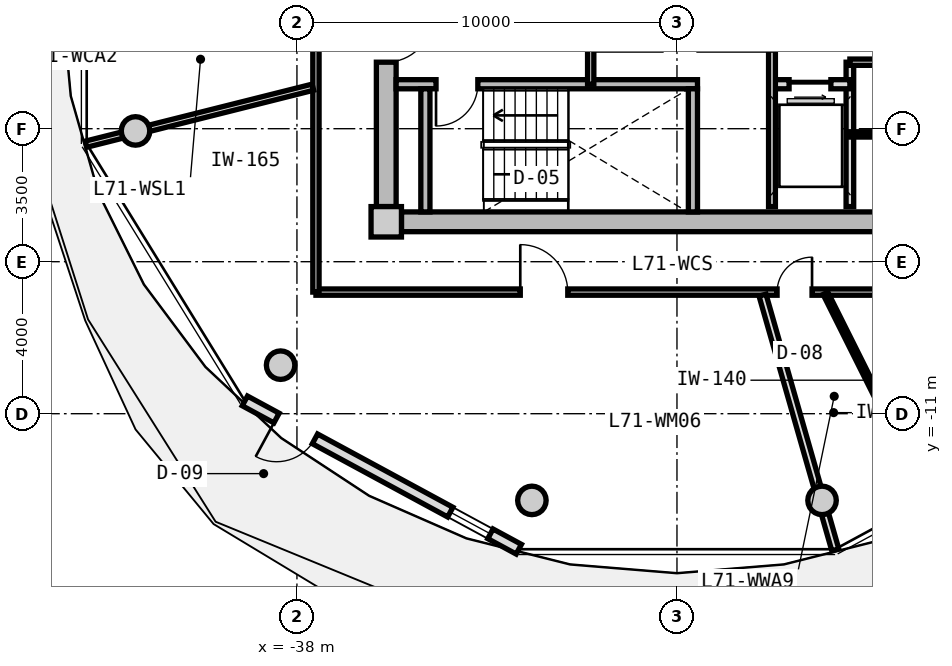
"""IFC4 building model, lengths in metres.
Left out: names, types, materials, properties, quantities, classifications, styles, units other than length and angle.
Written with IfcOpenShell. Run it as: python <this file> out.ifc"""

import sys

from ifc_helpers import new_model, si_unit, direction, frame, frame_2d, origin, origin_2d, place, context, subcontext, project, spatial, rectangle, circle, extrude, source, transform, mapped, element, fill, save


model = new_model("IFC4")
c1 = context("Model", 3, precision=1e-05, world=origin(), true_north=direction((0.0, 1.0)))
c2 = subcontext(c1, "Body", "Model", "MODEL_VIEW")
j1 = project(units=[si_unit("LENGTHUNIT", "METRE"), si_unit("PLANEANGLEUNIT", "RADIAN")], contexts=[c1])
p1 = place(None, origin())
s1 = spatial("IfcSite", under=j1, at=p1, CompositionType="ELEMENT")
p2 = place(p1, origin())
s2 = spatial("IfcBuilding", under=s1, at=p2, CompositionType="ELEMENT")
p3 = place(p2, frame((0.0, 0.0, 229.15)))
s3 = spatial("IfcBuildingStorey", under=s2, at=p3, CompositionType="ELEMENT", Elevation=229.15)
m1 = source(origin(), c2, "Body", "SweptSolid", [
    extrude(rectangle(XDim=0.8, YDim=0.8, at=origin_2d()), origin(), (0.0, 0.0, 1.0), 3.05),
])
p4 = place(p3, frame((-35.65, -5.95, 0.0), z_axis=(0.0, 0.0, 1.0), x_axis=(1.0, 0.0, 0.0)))
e1 = element("IfcColumn", 1, at=p4, inside=s3, PredefinedType="COLUMN", context=c2, shape_type="MappedRepresentation", body=[
    mapped(m1, transform((0.0, 0.0, 0.0), x_axis=(1.0, 0.0, 0.0), y_axis=(0.0, 1.0, 0.0), z_axis=(0.0, 0.0, 1.0), scale=1.0)),
])
m2 = source(origin(), c2, "Body", "SweptSolid", [
    extrude(rectangle(XDim=14.5, YDim=0.52, at=frame_2d((7.25, 0.0))), origin(), (0.0, 0.0, 1.0), 2.81),
])
p5 = place(p3, frame((-20.75, -5.95, 0.0), z_axis=(0.0, 0.0, 1.0), x_axis=(-1.0, 0.0, 0.0)))
e2 = element("IfcWall", 2, at=p5, inside=s3, PredefinedType="SHEAR", context=c2, shape_type="MappedRepresentation", body=[
    mapped(m2, transform((0.0, 0.0, 0.0), x_axis=(1.0, 0.0, 0.0), y_axis=(0.0, 1.0, 0.0), z_axis=(0.0, 0.0, 1.0), scale=1.0)),
])
m3 = source(origin(), c2, "Body", "SweptSolid", [
    extrude(rectangle(XDim=11.1, YDim=0.52, at=frame_2d((5.55, 0.0))), origin(), (0.0, 0.0, 1.0), 2.81),
])
p6 = place(p3, frame((-35.65, -5.55, 0.0), z_axis=(0.0, 0.0, 1.0), x_axis=(0.0, 1.0, 0.0)))
e3 = element("IfcWall", 3, at=p6, inside=s3, PredefinedType="SHEAR", context=c2, shape_type="MappedRepresentation", body=[
    mapped(m3, transform((0.0, 0.0, 0.0), x_axis=(1.0, 0.0, 0.0), y_axis=(0.0, 1.0, 0.0), z_axis=(0.0, 0.0, 1.0), scale=1.0)),
])
p7 = place(p6, frame((3.8, 0.0, 0.0)))
e4 = element("IfcOpeningElement", 4, at=p7, cuts=e3, PredefinedType="OPENING", context=c2, shape_type="SweptSolid", body=[
    extrude(rectangle(XDim=1.2, YDim=2.15, at=frame_2d((0.6, 1.075))), frame((0.0, 0.27, 0.0), z_axis=(0.0, -1.0, 0.0), x_axis=(1.0, 0.0, 0.0)), (0.0, 0.0, 1.0), 0.54),
])
m4 = source(origin(), c2, "Body", "SweptSolid", [
    extrude(circle(Radius=0.375, at=origin_2d()), origin(), (0.0, 0.0, 1.0), 3.05),
])
for number, where, z_axis, x_axis in (
    (5, (-42.247, -3.559, 0.0), (0.0, 0.0, 1.0), (1.0, 0.0, 0.0)),
    (6, (-38.43, -9.723, 0.0), (0.0, 0.0, 1.0), (1.0, 0.0, 0.0)),
    (7, (-31.818, -13.281, 0.0), (0.0, 0.0, 1.0), (1.0, 0.0, 0.0)),
    (8, (-24.182, -13.281, 0.0), (0.0, 0.0, 1.0), (1.0, 0.0, 0.0)),
):
    element("IfcColumn", number, at=place(p3, frame(where, z_axis=z_axis, x_axis=x_axis)), inside=s3, PredefinedType="COLUMN", context=c2, shape_type="MappedRepresentation", body=[
        mapped(m4, transform((0.0, 0.0, 0.0), x_axis=(1.0, 0.0, 0.0), y_axis=(0.0, 1.0, 0.0), z_axis=(0.0, 0.0, 1.0), scale=1.0)),
    ])
m5 = source(origin(), c2, "Body", "SweptSolid", [
    extrude(rectangle(XDim=8.197, YDim=0.29, at=frame_2d((4.099, 0.0))), origin(), (0.0, 0.0, 1.0), 2.81),
])
p8 = place(p3, frame((-32.162, -14.566, 0.0), z_axis=(0.0, 0.0, 1.0), x_axis=(-0.879369910001, 0.476139224791, 0.0)))
e9 = element("IfcWall", 9, at=p8, inside=s3, PredefinedType="SOLIDWALL", context=c2, shape_type="MappedRepresentation", body=[
    mapped(m5, transform((0.0, 0.0, 0.0), x_axis=(1.0, 0.0, 0.0), y_axis=(0.0, 1.0, 0.0), z_axis=(0.0, 0.0, 1.0), scale=1.0)),
])
p9 = place(p8, frame((6.1, 0.0, 0.0)))
e10 = element("IfcOpeningElement", 10, at=p9, cuts=e9, PredefinedType="OPENING", context=c2, shape_type="SweptSolid", body=[
    extrude(rectangle(XDim=1.15, YDim=2.25, at=frame_2d((0.575, 1.125))), frame((0.0, 0.155, 0.0), z_axis=(0.0, -1.0, 0.0), x_axis=(1.0, 0.0, 0.0)), (0.0, 0.0, 1.0), 0.31),
])
p10 = place(p8, frame((0.85, 0.0, 0.85)))
e11 = element("IfcOpeningElement", 11, at=p10, cuts=e9, PredefinedType="OPENING", context=c2, shape_type="SweptSolid", body=[
    extrude(rectangle(XDim=1.2, YDim=1.5, at=frame_2d((0.6, 0.75))), frame((0.0, 0.155, 0.0), z_axis=(0.0, -1.0, 0.0), x_axis=(1.0, 0.0, 0.0)), (0.0, 0.0, 1.0), 0.31),
])
m6 = source(origin(), c2, "Body", "SweptSolid", [
    extrude(rectangle(XDim=7.93, YDim=0.24, at=frame_2d((3.965, 0.0))), origin(), (0.0, 0.0, 1.0), 2.81),
])
p11 = place(p3, frame((-35.39, -2.33, 0.0), z_axis=(0.0, 0.0, 1.0), x_axis=(1.0, 0.0, 0.0)))
e12 = element("IfcWall", 12, at=p11, inside=s3, PredefinedType="PARTITIONING", context=c2, shape_type="MappedRepresentation", body=[
    mapped(m6, transform((0.0, 0.0, 0.0), x_axis=(1.0, 0.0, 0.0), y_axis=(0.0, 1.0, 0.0), z_axis=(0.0, 0.0, 1.0), scale=1.0)),
])
p12 = place(p11, frame((1.05, 0.0, 0.0)))
e13 = element("IfcOpeningElement", 13, at=p12, cuts=e12, PredefinedType="OPENING", context=c2, shape_type="SweptSolid", body=[
    extrude(rectangle(XDim=1.1, YDim=2.15, at=frame_2d((0.55, 1.075))), frame((0.0, 0.13, 0.0), z_axis=(0.0, -1.0, 0.0), x_axis=(1.0, 0.0, 0.0)), (0.0, 0.0, 1.0), 0.26),
])
m7 = source(origin(), c2, "Body", "SweptSolid", [
    extrude(rectangle(XDim=3.24, YDim=0.24, at=frame_2d((1.62, 0.0))), origin(), (0.0, 0.0, 1.0), 2.81),
])
for number, where, z_axis, x_axis in (
    (14, (-34.62, -5.69, 0.0), (0.0, 0.0, 1.0), (0.0, 1.0, 0.0)),
    (15, (-27.58, -5.69, 0.0), (0.0, 0.0, 1.0), (0.0, 1.0, 0.0)),
):
    element("IfcWall", number, at=place(p3, frame(where, z_axis=z_axis, x_axis=x_axis)), inside=s3, PredefinedType="PARTITIONING", context=c2, shape_type="MappedRepresentation", body=[
        mapped(m7, transform((0.0, 0.0, 0.0), x_axis=(1.0, 0.0, 0.0), y_axis=(0.0, 1.0, 0.0), z_axis=(0.0, 0.0, 1.0), scale=1.0)),
    ])
m8 = source(origin(), c2, "Body", "SweptSolid", [
    extrude(rectangle(XDim=3.8, YDim=0.2, at=frame_2d((1.9, 0.0))), origin(), (0.0, 0.0, 1.0), 2.795),
])
p13 = place(p3, frame((-23.45, -5.55, 0.0), z_axis=(0.0, 0.0, 1.0), x_axis=(0.0, 1.0, 0.0)))
e16 = element("IfcWall", 16, at=p13, inside=s3, PredefinedType="PARTITIONING", context=c2, shape_type="MappedRepresentation", body=[
    mapped(m8, transform((0.0, 0.0, 0.0), x_axis=(1.0, 0.0, 0.0), y_axis=(0.0, 1.0, 0.0), z_axis=(0.0, 0.0, 1.0), scale=1.0)),
])
m9 = source(origin(), c2, "Body", "SweptSolid", [
    extrude(rectangle(XDim=2.05, YDim=0.24, at=frame_2d((1.025, 0.0))), origin(), (0.0, 0.0, 1.0), 2.795),
])
p14 = place(p3, frame((-25.5, -2.33, 0.0), z_axis=(0.0, 0.0, 1.0), x_axis=(1.0, 0.0, 0.0)))
e17 = element("IfcWall", 17, at=p14, inside=s3, PredefinedType="PARTITIONING", context=c2, shape_type="MappedRepresentation", body=[
    mapped(m9, transform((0.0, 0.0, 0.0), x_axis=(1.0, 0.0, 0.0), y_axis=(0.0, 1.0, 0.0), z_axis=(0.0, 0.0, 1.0), scale=1.0)),
])
p15 = place(p14, frame((0.45, 0.0, 0.0)))
e18 = element("IfcOpeningElement", 18, at=p15, cuts=e17, PredefinedType="OPENING", context=c2, shape_type="SweptSolid", body=[
    extrude(rectangle(XDim=1.1, YDim=2.2, at=frame_2d((0.55, 1.1))), frame((0.0, 0.13, 0.0), z_axis=(0.0, -1.0, 0.0), x_axis=(1.0, 0.0, 0.0)), (0.0, 0.0, 1.0), 0.26),
])
m10 = source(origin(), c2, "Body", "SweptSolid", [
    extrude(rectangle(XDim=4.2, YDim=0.18, at=frame_2d((2.1, 0.0))), origin(), (0.0, 0.0, 1.0), 2.795),
])
p16 = place(p3, frame((-25.5, -5.55, 0.0), z_axis=(0.0, 0.0, 1.0), x_axis=(0.0, 1.0, 0.0)))
e19 = element("IfcWall", 19, at=p16, inside=s3, PredefinedType="PARTITIONING", context=c2, shape_type="MappedRepresentation", body=[
    mapped(m10, transform((0.0, 0.0, 0.0), x_axis=(1.0, 0.0, 0.0), y_axis=(0.0, 1.0, 0.0), z_axis=(0.0, 0.0, 1.0), scale=1.0)),
])
m11 = source(origin(), c2, "Body", "SweptSolid", [
    extrude(rectangle(XDim=0.98, YDim=0.165, at=frame_2d((0.49, 0.0))), origin(), (0.0, 0.0, 1.0), 2.795),
])
p17 = place(p3, frame((-30.27, -2.33, 0.0), z_axis=(0.0, 0.0, 1.0), x_axis=(0.0, 1.0, 0.0)))
e20 = element("IfcWall", 20, at=p17, inside=s3, PredefinedType="PARTITIONING", context=c2, shape_type="MappedRepresentation", body=[
    mapped(m11, transform((0.0, 0.0, 0.0), x_axis=(1.0, 0.0, 0.0), y_axis=(0.0, 1.0, 0.0), z_axis=(0.0, 0.0, 1.0), scale=1.0)),
])
m12 = source(origin(), c2, "Body", "SweptSolid", [
    extrude(rectangle(XDim=2.7, YDim=0.165, at=frame_2d((1.35, 0.0))), origin(), (0.0, 0.0, 1.0), 2.795),
])
p18 = place(p3, frame((-23.45, -1.75, 0.0), z_axis=(0.0, 0.0, 1.0), x_axis=(1.0, 0.0, 0.0)))
e21 = element("IfcWall", 21, at=p18, inside=s3, PredefinedType="PARTITIONING", context=c2, shape_type="MappedRepresentation", body=[
    mapped(m12, transform((0.0, 0.0, 0.0), x_axis=(1.0, 0.0, 0.0), y_axis=(0.0, 1.0, 0.0), z_axis=(0.0, 0.0, 1.0), scale=1.0)),
])
p19 = place(p18, frame((0.85, 0.0, 0.0)))
e22 = element("IfcOpeningElement", 22, at=p19, cuts=e21, PredefinedType="OPENING", context=c2, shape_type="SweptSolid", body=[
    extrude(rectangle(XDim=0.925, YDim=2.1, at=frame_2d((0.462, 1.05))), frame((0.0, 0.093, 0.0), z_axis=(0.0, -1.0, 0.0), x_axis=(1.0, 0.0, 0.0)), (0.0, 0.0, 1.0), 0.185),
])
m13 = source(origin(), c2, "Body", "SweptSolid", [
    extrude(rectangle(XDim=2.7, YDim=0.14, at=frame_2d((1.35, 0.0))), origin(), (0.0, 0.0, 1.0), 2.795),
])
p20 = place(p3, frame((-23.45, -3.65, 0.0), z_axis=(0.0, 0.0, 1.0), x_axis=(1.0, 0.0, 0.0)))
e23 = element("IfcWall", 23, at=p20, inside=s3, PredefinedType="PARTITIONING", context=c2, shape_type="MappedRepresentation", body=[
    mapped(m13, transform((0.0, 0.0, 0.0), x_axis=(1.0, 0.0, 0.0), y_axis=(0.0, 1.0, 0.0), z_axis=(0.0, 0.0, 1.0), scale=1.0)),
])
m14 = source(origin(), c2, "Body", "SweptSolid", [
    extrude(rectangle(XDim=19.0, YDim=0.165, at=frame_2d((9.5, 0.0))), origin(), (0.0, 0.0, 1.0), 2.795),
])
p21 = place(p3, frame((-18.5, -7.8, 0.0), z_axis=(0.0, 0.0, 1.0), x_axis=(-1.0, 0.0, 0.0)))
e24 = element("IfcWall", 24, at=p21, inside=s3, PredefinedType="PARTITIONING", context=c2, shape_type="MappedRepresentation", body=[
    mapped(m14, transform((0.0, 0.0, 0.0), x_axis=(1.0, 0.0, 0.0), y_axis=(0.0, 1.0, 0.0), z_axis=(0.0, 0.0, 1.0), scale=1.0)),
])
p22 = place(p21, frame((12.373, 0.0, 0.0)))
e25 = element("IfcOpeningElement", 25, at=p22, cuts=e24, PredefinedType="OPENING", context=c2, shape_type="SweptSolid", body=[
    extrude(rectangle(XDim=1.25, YDim=2.2, at=frame_2d((0.625, 1.1))), frame((0.0, 0.093, 0.0), z_axis=(0.0, -1.0, 0.0), x_axis=(1.0, 0.0, 0.0)), (0.0, 0.0, 1.0), 0.185),
])
p23 = place(p21, frame((5.946, 0.0, 0.0)))
e26 = element("IfcOpeningElement", 26, at=p23, cuts=e24, PredefinedType="OPENING", context=c2, shape_type="SweptSolid", body=[
    extrude(rectangle(XDim=0.92, YDim=2.1, at=frame_2d((0.46, 1.05))), frame((0.0, 0.093, 0.0), z_axis=(0.0, -1.0, 0.0), x_axis=(1.0, 0.0, 0.0)), (0.0, 0.0, 1.0), 0.185),
])
p24 = place(p21, frame((2.83, 0.0, 0.0)))
e27 = element("IfcOpeningElement", 27, at=p24, cuts=e24, PredefinedType="OPENING", context=c2, shape_type="SweptSolid", body=[
    extrude(rectangle(XDim=0.92, YDim=2.1, at=frame_2d((0.46, 1.05))), frame((0.0, 0.093, 0.0), z_axis=(0.0, -1.0, 0.0), x_axis=(1.0, 0.0, 0.0)), (0.0, 0.0, 1.0), 0.185),
])
m15 = source(origin(), c2, "Body", "SweptSolid", [
    extrude(rectangle(XDim=6.88, YDim=0.165, at=frame_2d((3.44, 0.0))), origin(), (0.0, 0.0, 1.0), 2.795),
])
p25 = place(p3, frame((-37.5, -7.8, 0.0), z_axis=(0.0, 0.0, 1.0), x_axis=(0.0, 1.0, 0.0)))
e28 = element("IfcWall", 28, at=p25, inside=s3, PredefinedType="PARTITIONING", context=c2, shape_type="MappedRepresentation", body=[
    mapped(m15, transform((0.0, 0.0, 0.0), x_axis=(1.0, 0.0, 0.0), y_axis=(0.0, 1.0, 0.0), z_axis=(0.0, 0.0, 1.0), scale=1.0)),
])
m16 = source(origin(), c2, "Body", "SweptSolid", [
    extrude(rectangle(XDim=6.157, YDim=0.165, at=frame_2d((3.079, 0.0))), origin(), (0.0, 0.0, 1.0), 2.395),
])
p26 = place(p3, frame((-37.58, -2.407, 0.0), z_axis=(0.0, 0.0, 1.0), x_axis=(-0.969840867184, -0.243738984038, 0.0)))
e29 = element("IfcWall", 29, at=p26, inside=s3, PredefinedType="PARTITIONING", context=c2, shape_type="MappedRepresentation", body=[
    mapped(m16, transform((0.0, 0.0, 0.0), x_axis=(1.0, 0.0, 0.0), y_axis=(0.0, 1.0, 0.0), z_axis=(0.0, 0.0, 1.0), scale=1.0)),
])
m17 = source(origin(), c2, "Body", "SweptSolid", [
    extrude(rectangle(XDim=6.974, YDim=0.19, at=frame_2d((3.487, 0.0))), origin(), (0.0, 0.0, 1.0), 2.395),
])
p27 = place(p3, frame((-25.749, -7.88, 0.0), z_axis=(0.0, 0.0, 1.0), x_axis=(0.274707256801, -0.961527910703, 0.0)))
e30 = element("IfcWall", 30, at=p27, inside=s3, PredefinedType="PARTITIONING", context=c2, shape_type="MappedRepresentation", body=[
    mapped(m17, transform((0.0, 0.0, 0.0), x_axis=(1.0, 0.0, 0.0), y_axis=(0.0, 1.0, 0.0), z_axis=(0.0, 0.0, 1.0), scale=1.0)),
])
m18 = source(origin(), c2, "Body", "SweptSolid", [
    extrude(rectangle(XDim=6.067, YDim=0.14, at=frame_2d((3.034, 0.0))), origin(), (0.0, 0.0, 1.0), 2.795),
])
p28 = place(p3, frame((-24.093, -7.83, 0.0), z_axis=(0.0, 0.0, 1.0), x_axis=(0.447261882231, -0.894403046005, 0.0)))
e31 = element("IfcWall", 31, at=p28, inside=s3, PredefinedType="PARTITIONING", context=c2, shape_type="MappedRepresentation", body=[
    mapped(m18, transform((0.0, 0.0, 0.0), x_axis=(1.0, 0.0, 0.0), y_axis=(0.0, 1.0, 0.0), z_axis=(0.0, 0.0, 1.0), scale=1.0)),
])
m19 = source(origin(), c2, "Body", "SweptSolid", [
    extrude(rectangle(XDim=1.15, YDim=2.25, at=frame_2d((0.575, 1.125))), frame((0.0, 0.025, 0.0), z_axis=(0.0, -1.0, 0.0), x_axis=(1.0, 0.0, 0.0)), (0.0, 0.0, 1.0), 0.05),
])
p29 = place(p9, origin())
e32 = element("IfcDoor", 32, at=p29, inside=s3, OperationType="SINGLE_SWING_RIGHT", PredefinedType="DOOR", context=c2, shape_type="MappedRepresentation", body=[
    mapped(m19, transform((0.0, 0.0, 0.0), x_axis=(1.0, 0.0, 0.0), y_axis=(0.0, 1.0, 0.0), z_axis=(0.0, 0.0, 1.0), scale=1.0)),
])
fill(e10, e32)
m20 = source(origin(), c2, "Body", "SweptSolid", [
    extrude(rectangle(XDim=1.2, YDim=1.5, at=frame_2d((0.6, 0.75))), frame((0.0, 0.03, 0.0), z_axis=(0.0, -1.0, 0.0), x_axis=(1.0, 0.0, 0.0)), (0.0, 0.0, 1.0), 0.06),
])
p30 = place(p10, origin())
e33 = element("IfcWindow", 33, at=p30, inside=s3, PartitioningType="SINGLE_PANEL", PredefinedType="WINDOW", context=c2, shape_type="MappedRepresentation", body=[
    mapped(m20, transform((0.0, 0.0, 0.0), x_axis=(1.0, 0.0, 0.0), y_axis=(0.0, 1.0, 0.0), z_axis=(0.0, 0.0, 1.0), scale=1.0)),
])
fill(e11, e33)
m21 = source(origin(), c2, "Body", "SweptSolid", [
    extrude(rectangle(XDim=1.1, YDim=2.15, at=frame_2d((0.55, 1.075))), frame((0.0, 0.025, 0.0), z_axis=(0.0, -1.0, 0.0), x_axis=(1.0, 0.0, 0.0)), (0.0, 0.0, 1.0), 0.05),
])
p31 = place(p12, frame((1.1, 0.0, 0.0), z_axis=(0.0, 0.0, 1.0), x_axis=(-1.0, 0.0, 0.0)))
e34 = element("IfcDoor", 34, at=p31, inside=s3, OperationType="SINGLE_SWING_RIGHT", PredefinedType="DOOR", context=c2, shape_type="MappedRepresentation", body=[
    mapped(m21, transform((0.0, 0.0, 0.0), x_axis=(1.0, 0.0, 0.0), y_axis=(0.0, 1.0, 0.0), z_axis=(0.0, 0.0, 1.0), scale=1.0)),
])
fill(e13, e34)
m22 = source(origin(), c2, "Body", "SweptSolid", [
    extrude(rectangle(XDim=1.2, YDim=2.15, at=frame_2d((0.6, 1.075))), frame((0.0, 0.025, 0.0), z_axis=(0.0, -1.0, 0.0), x_axis=(1.0, 0.0, 0.0)), (0.0, 0.0, 1.0), 0.05),
])
p32 = place(p7, frame((1.2, 0.0, 0.0), z_axis=(0.0, 0.0, 1.0), x_axis=(-1.0, 0.0, 0.0)))
e35 = element("IfcDoor", 35, at=p32, inside=s3, OperationType="SINGLE_SWING_LEFT", PredefinedType="DOOR", context=c2, shape_type="MappedRepresentation", body=[
    mapped(m22, transform((0.0, 0.0, 0.0), x_axis=(1.0, 0.0, 0.0), y_axis=(0.0, 1.0, 0.0), z_axis=(0.0, 0.0, 1.0), scale=1.0)),
])
fill(e4, e35)
m23 = source(origin(), c2, "Body", "SweptSolid", [
    extrude(rectangle(XDim=1.1, YDim=2.2, at=frame_2d((0.55, 1.1))), frame((0.0, 0.025, 0.0), z_axis=(0.0, -1.0, 0.0), x_axis=(1.0, 0.0, 0.0)), (0.0, 0.0, 1.0), 0.05),
])
p33 = place(p15, frame((1.1, 0.0, 0.0), z_axis=(0.0, 0.0, 1.0), x_axis=(-1.0, 0.0, 0.0)))
e36 = element("IfcDoor", 36, at=p33, inside=s3, OperationType="SLIDING_TO_RIGHT", PredefinedType="DOOR", context=c2, shape_type="MappedRepresentation", body=[
    mapped(m23, transform((0.0, 0.0, 0.0), x_axis=(1.0, 0.0, 0.0), y_axis=(0.0, 1.0, 0.0), z_axis=(0.0, 0.0, 1.0), scale=1.0)),
])
fill(e18, e36)
m24 = source(origin(), c2, "Body", "SweptSolid", [
    extrude(rectangle(XDim=1.25, YDim=2.2, at=frame_2d((0.625, 1.1))), frame((0.0, 0.025, 0.0), z_axis=(0.0, -1.0, 0.0), x_axis=(1.0, 0.0, 0.0)), (0.0, 0.0, 1.0), 0.05),
])
p34 = place(p22, frame((1.25, 0.0, 0.0), z_axis=(0.0, 0.0, 1.0), x_axis=(-1.0, 0.0, 0.0)))
e37 = element("IfcDoor", 37, at=p34, inside=s3, OperationType="SINGLE_SWING_LEFT", PredefinedType="DOOR", context=c2, shape_type="MappedRepresentation", body=[
    mapped(m24, transform((0.0, 0.0, 0.0), x_axis=(1.0, 0.0, 0.0), y_axis=(0.0, 1.0, 0.0), z_axis=(0.0, 0.0, 1.0), scale=1.0)),
])
fill(e25, e37)
m25 = source(origin(), c2, "Body", "SweptSolid", [
    extrude(rectangle(XDim=0.92, YDim=2.1, at=frame_2d((0.46, 1.05))), frame((0.0, 0.025, 0.0), z_axis=(0.0, -1.0, 0.0), x_axis=(1.0, 0.0, 0.0)), (0.0, 0.0, 1.0), 0.05),
])
p35 = place(p23, frame((0.92, 0.0, 0.0), z_axis=(0.0, 0.0, 1.0), x_axis=(-1.0, 0.0, 0.0)))
e38 = element("IfcDoor", 38, at=p35, inside=s3, OperationType="SINGLE_SWING_RIGHT", PredefinedType="DOOR", context=c2, shape_type="MappedRepresentation", body=[
    mapped(m25, transform((0.0, 0.0, 0.0), x_axis=(1.0, 0.0, 0.0), y_axis=(0.0, 1.0, 0.0), z_axis=(0.0, 0.0, 1.0), scale=1.0)),
])
fill(e26, e38)
save(model, sys.argv[1])
